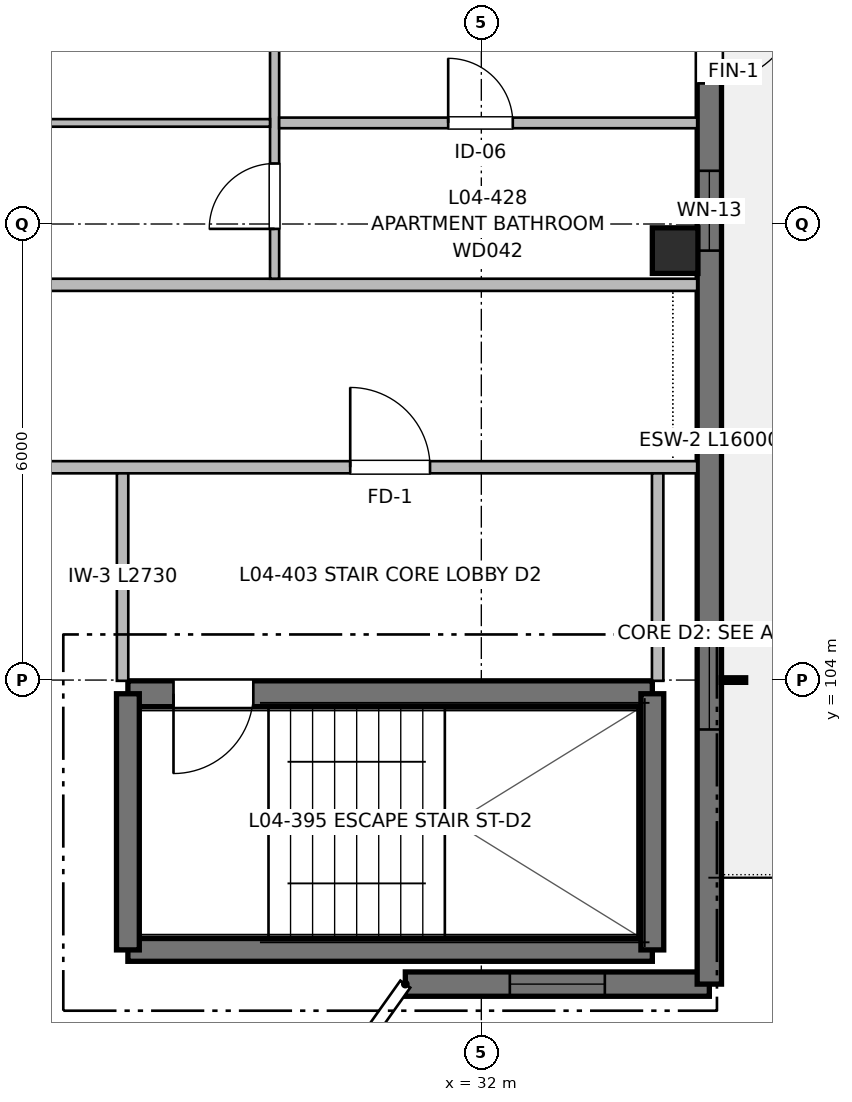
"""IFC4 building model, lengths in metres.
Left out: names, types, materials, properties, quantities, classifications, styles, units other than length and angle.
Written with IfcOpenShell. Run it as: python <this file> out.ifc"""

import sys

from ifc_helpers import new_model, si_unit, direction, frame, frame_2d, origin, origin_2d, place, context, subcontext, project, spatial, rectangle, extrude, element, fill, save


model = new_model("IFC4")
c1 = context("Model", 3, precision=1e-05, world=origin(), true_north=direction((0.0, 1.0)))
c2 = subcontext(c1, "Body", "Model", "MODEL_VIEW")
j1 = project(units=[si_unit("LENGTHUNIT", "METRE"), si_unit("PLANEANGLEUNIT", "RADIAN")], contexts=[c1])
p1 = place(None, origin())
s1 = spatial("IfcSite", under=j1, at=p1, CompositionType="ELEMENT")
p2 = place(p1, origin())
s2 = spatial("IfcBuilding", under=s1, at=p2, CompositionType="ELEMENT")
p3 = place(p2, frame((0.0, 0.0, 13.76)))
s3 = spatial("IfcBuildingStorey", under=s2, at=p3, CompositionType="ELEMENT", Elevation=13.76)
p4 = place(p3, frame((34.55, 109.65, 0.0), z_axis=(0.0, 0.0, 1.0), x_axis=(1.0, 0.0, 0.0)))
e1 = element("IfcColumn", 1, at=p4, inside=s3, PredefinedType="COLUMN", context=c2, shape_type="SweptSolid", body=[
    extrude(rectangle(XDim=0.6, YDim=0.6, at=origin_2d()), origin(), (0.0, 0.0, 1.0), 3.2),
])
p5 = place(p3, frame((27.35, 100.45, 0.0), z_axis=(0.0, 0.0, 1.0), x_axis=(1.0, 0.0, 0.0)))
e2 = element("IfcWall", 2, at=p5, inside=s3, PredefinedType="SHEAR", context=c2, shape_type="SweptSolid", body=[
    extrude(rectangle(XDim=6.9, YDim=0.3, at=frame_2d((3.45, 0.0))), origin(), (0.0, 0.0, 1.0), 3.2),
])
p6 = place(p3, frame((34.25, 103.82, 0.0), z_axis=(0.0, 0.0, 1.0), x_axis=(-1.0, 0.0, 0.0)))
e3 = element("IfcWall", 3, at=p6, inside=s3, PredefinedType="SHEAR", context=c2, shape_type="SweptSolid", body=[
    extrude(rectangle(XDim=6.9, YDim=0.34, at=frame_2d((3.45, 0.0))), origin(), (0.0, 0.0, 1.0), 3.2),
])
p7 = place(p6, frame((5.25, 0.0, 0.0)))
e4 = element("IfcOpeningElement", 4, at=p7, cuts=e3, PredefinedType="OPENING", context=c2, shape_type="SweptSolid", body=[
    extrude(rectangle(XDim=1.05, YDim=2.15, at=frame_2d((0.525, 1.075))), frame((0.0, 0.18, 0.0), z_axis=(0.0, -1.0, 0.0), x_axis=(1.0, 0.0, 0.0)), (0.0, 0.0, 1.0), 0.36),
])
for number, where, z_axis, x_axis in (
    (5, (27.35, 103.82, 0.0), (0.0, 0.0, 1.0), (0.0, -1.0, 0.0)),
    (6, (34.25, 100.45, 0.0), (0.0, 0.0, 1.0), (0.0, 1.0, 0.0)),
):
    element("IfcWall", number, at=place(p3, frame(where, z_axis=z_axis, x_axis=x_axis)), inside=s3, PredefinedType="SHEAR", context=c2, shape_type="SweptSolid", body=[
        extrude(rectangle(XDim=3.37, YDim=0.3, at=frame_2d((1.685, 0.0))), origin(), (0.0, 0.0, 1.0), 3.2),
    ])
p8 = place(p3, frame((35.0, 100.0, 0.0), z_axis=(0.0, 0.0, 1.0), x_axis=(-1.0, 0.0, 0.0)))
e7 = element("IfcWall", 7, at=p8, inside=s3, PredefinedType="SHEAR", context=c2, shape_type="SweptSolid", body=[
    extrude(rectangle(XDim=4.0, YDim=0.32, at=frame_2d((2.0, 0.0))), origin(), (0.0, 0.0, 1.0), 2.98),
])
p9 = place(p8, frame((1.375, 0.0, 0.87)))
e8 = element("IfcOpeningElement", 8, at=p9, cuts=e7, PredefinedType="OPENING", context=c2, shape_type="SweptSolid", body=[
    extrude(rectangle(XDim=1.25, YDim=1.35, at=frame_2d((0.625, 0.675))), frame((0.0, 0.17, 0.0), z_axis=(0.0, -1.0, 0.0), x_axis=(1.0, 0.0, 0.0)), (0.0, 0.0, 1.0), 0.34),
])
p10 = place(p3, frame((35.0, 116.0, 0.0), z_axis=(0.0, 0.0, 1.0), x_axis=(0.0, -1.0, 0.0)))
e9 = element("IfcWall", 9, at=p10, inside=s3, PredefinedType="SHEAR", context=c2, shape_type="SweptSolid", body=[
    extrude(rectangle(XDim=16.0, YDim=0.32, at=frame_2d((8.0, 0.0))), origin(), (0.0, 0.0, 1.0), 2.98),
])
p11 = place(p10, frame((2.95, 0.0, 0.0)))
e10 = element("IfcOpeningElement", 10, at=p11, cuts=e9, PredefinedType="OPENING", context=c2, shape_type="SweptSolid", body=[
    extrude(rectangle(XDim=1.2, YDim=2.2, at=frame_2d((0.6, 1.1))), frame((0.0, 0.17, 0.0), z_axis=(0.0, -1.0, 0.0), x_axis=(1.0, 0.0, 0.0)), (0.0, 0.0, 1.0), 0.34),
])
p12 = place(p10, frame((5.3, 0.0, 0.9)))
e11 = element("IfcOpeningElement", 11, at=p12, cuts=e9, PredefinedType="OPENING", context=c2, shape_type="SweptSolid", body=[
    extrude(rectangle(XDim=1.05, YDim=1.15, at=frame_2d((0.525, 0.575))), frame((0.0, 0.17, 0.0), z_axis=(0.0, -1.0, 0.0), x_axis=(1.0, 0.0, 0.0)), (0.0, 0.0, 1.0), 0.34),
])
p13 = place(p10, frame((11.35, 0.0, 0.82)))
e12 = element("IfcOpeningElement", 12, at=p13, cuts=e9, PredefinedType="OPENING", context=c2, shape_type="SweptSolid", body=[
    extrude(rectangle(XDim=1.3, YDim=1.4, at=frame_2d((0.65, 0.7))), frame((0.0, 0.17, 0.0), z_axis=(0.0, -1.0, 0.0), x_axis=(1.0, 0.0, 0.0)), (0.0, 0.0, 1.0), 0.34),
])
p14 = place(p3, frame((17.2, 106.8, 0.0), z_axis=(0.0, 0.0, 1.0), x_axis=(1.0, 0.0, 0.0)))
e13 = element("IfcWall", 13, at=p14, inside=s3, PredefinedType="PARTITIONING", context=c2, shape_type="SweptSolid", body=[
    extrude(rectangle(XDim=17.64, YDim=0.16, at=frame_2d((8.82, 0.0))), origin(), (0.0, 0.0, 1.0), 2.935),
])
p15 = place(p14, frame((13.075, 0.0, 0.0)))
e14 = element("IfcOpeningElement", 14, at=p15, cuts=e13, PredefinedType="OPENING", context=c2, shape_type="SweptSolid", body=[
    extrude(rectangle(XDim=1.05, YDim=2.15, at=frame_2d((0.525, 1.075))), frame((0.0, 0.09, 0.0), z_axis=(0.0, -1.0, 0.0), x_axis=(1.0, 0.0, 0.0)), (0.0, 0.0, 1.0), 0.18),
])
p16 = place(p3, frame((8.16, 109.2, 0.0), z_axis=(0.0, 0.0, 1.0), x_axis=(1.0, 0.0, 0.0)))
e15 = element("IfcWall", 15, at=p16, inside=s3, PredefinedType="PARTITIONING", context=c2, shape_type="SweptSolid", body=[
    extrude(rectangle(XDim=26.68, YDim=0.16, at=frame_2d((13.34, 0.0))), origin(), (0.0, 0.0, 1.0), 2.935),
])
p17 = place(p16, frame((3.35, 0.0, 0.0)))
e16 = element("IfcOpeningElement", 16, at=p17, cuts=e15, PredefinedType="OPENING", context=c2, shape_type="SweptSolid", body=[
    extrude(rectangle(XDim=0.98, YDim=2.15, at=frame_2d((0.49, 1.075))), frame((0.0, 0.09, 0.0), z_axis=(0.0, -1.0, 0.0), x_axis=(1.0, 0.0, 0.0)), (0.0, 0.0, 1.0), 0.18),
])
p18 = place(p16, frame((15.985, 0.0, 0.0)))
e17 = element("IfcOpeningElement", 17, at=p18, cuts=e15, PredefinedType="OPENING", context=c2, shape_type="SweptSolid", body=[
    extrude(rectangle(XDim=0.98, YDim=2.15, at=frame_2d((0.49, 1.075))), frame((0.0, 0.09, 0.0), z_axis=(0.0, -1.0, 0.0), x_axis=(1.0, 0.0, 0.0)), (0.0, 0.0, 1.0), 0.18),
])
for number, where, z_axis, x_axis in (
    (18, (27.28, 103.99, 0.0), (0.0, 0.0, 1.0), (0.0, 1.0, 0.0)),
    (19, (34.32, 103.99, 0.0), (0.0, 0.0, 1.0), (0.0, 1.0, 0.0)),
):
    element("IfcWall", number, at=place(p3, frame(where, z_axis=z_axis, x_axis=x_axis)), inside=s3, PredefinedType="PARTITIONING", context=c2, shape_type="SweptSolid", body=[
        extrude(rectangle(XDim=2.73, YDim=0.15, at=frame_2d((1.365, 0.0))), origin(), (0.0, 0.0, 1.0), 2.935),
    ])
p19 = place(p3, frame((29.28, 109.28, 0.0), z_axis=(0.0, 0.0, 1.0), x_axis=(0.0, 1.0, 0.0)))
e20 = element("IfcWall", 20, at=p19, inside=s3, PredefinedType="PARTITIONING", context=c2, shape_type="SweptSolid", body=[
    extrude(rectangle(XDim=6.59, YDim=0.12, at=frame_2d((3.295, 0.0))), origin(), (0.0, 0.0, 1.0), 2.935),
])
p20 = place(p19, frame((0.656, 0.0, 0.0)))
e21 = element("IfcOpeningElement", 21, at=p20, cuts=e20, PredefinedType="OPENING", context=c2, shape_type="SweptSolid", body=[
    extrude(rectangle(XDim=0.86, YDim=2.1, at=frame_2d((0.43, 1.05))), frame((0.0, 0.07, 0.0), z_axis=(0.0, -1.0, 0.0), x_axis=(1.0, 0.0, 0.0)), (0.0, 0.0, 1.0), 0.14),
])
p21 = place(p19, frame((4.093, 0.0, 0.0)))
e22 = element("IfcOpeningElement", 22, at=p21, cuts=e20, PredefinedType="OPENING", context=c2, shape_type="SweptSolid", body=[
    extrude(rectangle(XDim=0.9, YDim=2.1, at=frame_2d((0.45, 1.05))), frame((0.0, 0.07, 0.0), z_axis=(0.0, -1.0, 0.0), x_axis=(1.0, 0.0, 0.0)), (0.0, 0.0, 1.0), 0.14),
])
p22 = place(p3, frame((29.34, 111.33, 0.0), z_axis=(0.0, 0.0, 1.0), x_axis=(1.0, 0.0, 0.0)))
e23 = element("IfcWall", 23, at=p22, inside=s3, PredefinedType="PARTITIONING", context=c2, shape_type="SweptSolid", body=[
    extrude(rectangle(XDim=5.5, YDim=0.14, at=frame_2d((2.75, 0.0))), origin(), (0.0, 0.0, 1.0), 2.935),
])
p23 = place(p22, frame((2.224, 0.0, 0.0)))
e24 = element("IfcOpeningElement", 24, at=p23, cuts=e23, PredefinedType="OPENING", context=c2, shape_type="SweptSolid", body=[
    extrude(rectangle(XDim=0.85, YDim=2.05, at=frame_2d((0.425, 1.025))), frame((0.0, 0.08, 0.0), z_axis=(0.0, -1.0, 0.0), x_axis=(1.0, 0.0, 0.0)), (0.0, 0.0, 1.0), 0.16),
])
p24 = place(p3, frame((21.59, 111.33, 0.0), z_axis=(0.0, 0.0, 1.0), x_axis=(1.0, 0.0, 0.0)))
e25 = element("IfcWall", 25, at=p24, inside=s3, PredefinedType="PARTITIONING", context=c2, shape_type="SweptSolid", body=[
    extrude(rectangle(XDim=7.63, YDim=0.1, at=frame_2d((3.815, 0.0))), origin(), (0.0, 0.0, 1.0), 2.935),
])
p25 = place(p24, frame((3.076, 0.0, 0.0)))
e26 = element("IfcOpeningElement", 26, at=p25, cuts=e25, PredefinedType="OPENING", context=c2, shape_type="SweptSolid", body=[
    extrude(rectangle(XDim=0.92, YDim=2.1, at=frame_2d((0.46, 1.05))), frame((0.0, 0.06, 0.0), z_axis=(0.0, -1.0, 0.0), x_axis=(1.0, 0.0, 0.0)), (0.0, 0.0, 1.0), 0.12),
])
p26 = place(p7, origin())
e27 = element("IfcDoor", 27, at=p26, inside=s3, OperationType="SINGLE_SWING_RIGHT", PredefinedType="DOOR", context=c2, shape_type="SweptSolid", body=[
    extrude(rectangle(XDim=1.05, YDim=2.15, at=frame_2d((0.525, 1.075))), frame((0.0, 0.025, 0.0), z_axis=(0.0, -1.0, 0.0), x_axis=(1.0, 0.0, 0.0)), (0.0, 0.0, 1.0), 0.05),
])
fill(e4, e27)
p27 = place(p9, origin())
e28 = element("IfcWindow", 28, at=p27, inside=s3, PartitioningType="SINGLE_PANEL", PredefinedType="WINDOW", context=c2, shape_type="SweptSolid", body=[
    extrude(rectangle(XDim=1.25, YDim=1.35, at=frame_2d((0.625, 0.675))), frame((0.0, 0.03, 0.0), z_axis=(0.0, -1.0, 0.0), x_axis=(1.0, 0.0, 0.0)), (0.0, 0.0, 1.0), 0.06),
])
fill(e8, e28)
p28 = place(p11, origin())
e29 = element("IfcDoor", 29, at=p28, inside=s3, OperationType="SINGLE_SWING_LEFT", PredefinedType="DOOR", context=c2, shape_type="SweptSolid", body=[
    extrude(rectangle(XDim=1.2, YDim=2.2, at=frame_2d((0.6, 1.1))), frame((0.0, 0.025, 0.0), z_axis=(0.0, -1.0, 0.0), x_axis=(1.0, 0.0, 0.0)), (0.0, 0.0, 1.0), 0.05),
])
fill(e10, e29)
p29 = place(p12, origin())
e30 = element("IfcWindow", 30, at=p29, inside=s3, PartitioningType="SINGLE_PANEL", PredefinedType="WINDOW", context=c2, shape_type="SweptSolid", body=[
    extrude(rectangle(XDim=1.05, YDim=1.15, at=frame_2d((0.525, 0.575))), frame((0.0, 0.03, 0.0), z_axis=(0.0, -1.0, 0.0), x_axis=(1.0, 0.0, 0.0)), (0.0, 0.0, 1.0), 0.06),
])
fill(e11, e30)
p30 = place(p13, origin())
e31 = element("IfcWindow", 31, at=p30, inside=s3, PartitioningType="SINGLE_PANEL", PredefinedType="WINDOW", context=c2, shape_type="SweptSolid", body=[
    extrude(rectangle(XDim=1.3, YDim=1.4, at=frame_2d((0.65, 0.7))), frame((0.0, 0.03, 0.0), z_axis=(0.0, -1.0, 0.0), x_axis=(1.0, 0.0, 0.0)), (0.0, 0.0, 1.0), 0.06),
])
fill(e12, e31)
p31 = place(p15, origin())
e32 = element("IfcDoor", 32, at=p31, inside=s3, OperationType="SINGLE_SWING_LEFT", PredefinedType="DOOR", context=c2, shape_type="SweptSolid", body=[
    extrude(rectangle(XDim=1.05, YDim=2.15, at=frame_2d((0.525, 1.075))), frame((0.0, 0.025, 0.0), z_axis=(0.0, -1.0, 0.0), x_axis=(1.0, 0.0, 0.0)), (0.0, 0.0, 1.0), 0.05),
])
fill(e14, e32)
p32 = place(p20, origin())
e33 = element("IfcDoor", 33, at=p32, inside=s3, OperationType="SINGLE_SWING_LEFT", PredefinedType="DOOR", context=c2, shape_type="SweptSolid", body=[
    extrude(rectangle(XDim=0.86, YDim=2.1, at=frame_2d((0.43, 1.05))), frame((0.0, 0.025, 0.0), z_axis=(0.0, -1.0, 0.0), x_axis=(1.0, 0.0, 0.0)), (0.0, 0.0, 1.0), 0.05),
])
fill(e21, e33)
p33 = place(p23, origin())
e34 = element("IfcDoor", 34, at=p33, inside=s3, OperationType="SINGLE_SWING_LEFT", PredefinedType="DOOR", context=c2, shape_type="SweptSolid", body=[
    extrude(rectangle(XDim=0.85, YDim=2.05, at=frame_2d((0.425, 1.025))), frame((0.0, 0.025, 0.0), z_axis=(0.0, -1.0, 0.0), x_axis=(1.0, 0.0, 0.0)), (0.0, 0.0, 1.0), 0.05),
])
fill(e24, e34)
save(model, sys.argv[1])
